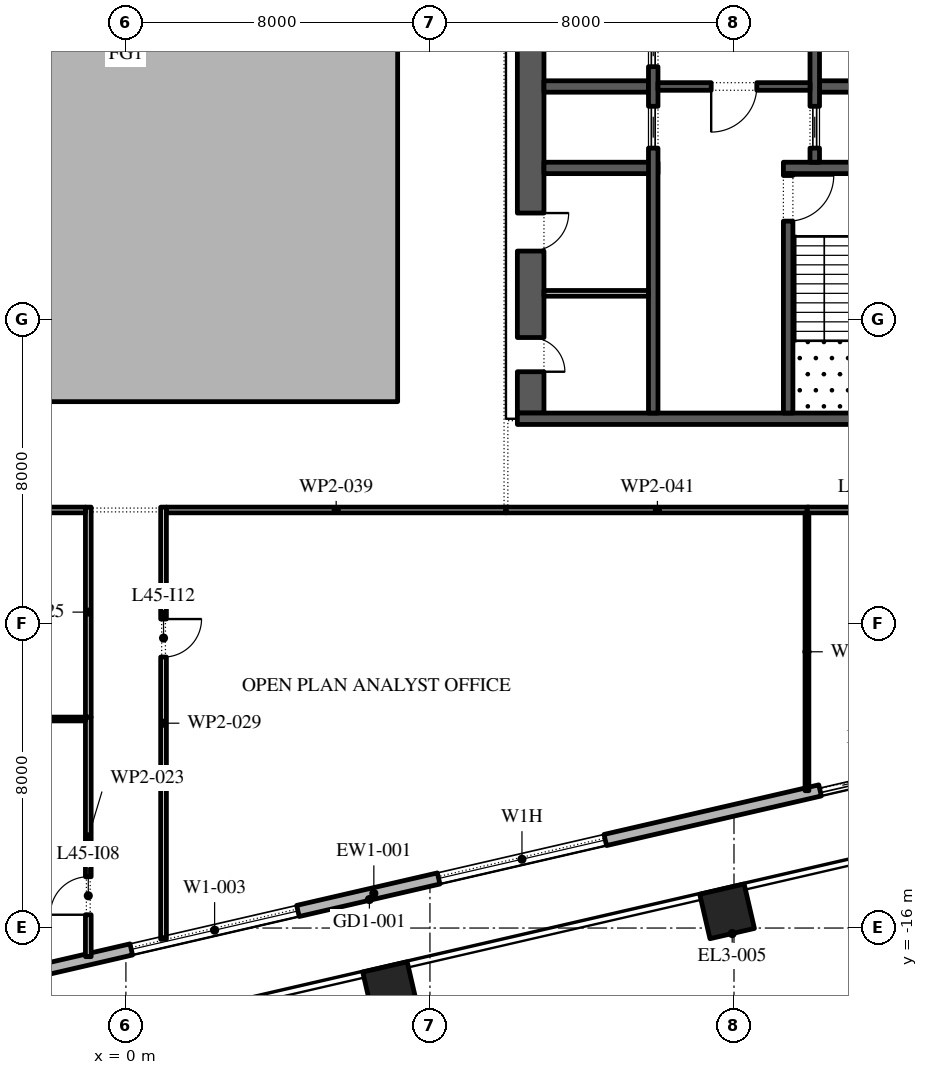
"""IFC4 building model, lengths in metres.
Left out: names, types, materials, properties, quantities, classifications, styles, units other than length and angle.
Written with IfcOpenShell. Run it as: python <this file> out.ifc"""

import sys

from ifc_helpers import new_model, si_unit, direction, frame, frame_2d, origin, origin_2d, place, context, subcontext, project, spatial, polyline, rectangle, outline, extrude, element, fill, save


model = new_model("IFC4")
c1 = context("Model", 3, precision=1e-05, world=origin(), true_north=direction((0.0, 1.0)))
c2 = subcontext(c1, "Body", "Model", "MODEL_VIEW")
j1 = project(units=[si_unit("LENGTHUNIT", "METRE"), si_unit("PLANEANGLEUNIT", "RADIAN")], contexts=[c1])
p1 = place(None, origin())
s1 = spatial("IfcSite", under=j1, at=p1, CompositionType="ELEMENT")
p2 = place(p1, origin())
s2 = spatial("IfcBuilding", under=s1, at=p2, CompositionType="ELEMENT")
p3 = place(p2, frame((0.0, 0.0, 205.2)))
s3 = spatial("IfcBuildingStorey", under=s2, at=p3, CompositionType="ELEMENT", Elevation=205.2)
for number, where, z_axis, x_axis in (
    (1, (6.951, -17.608, 0.0), (0.0, 0.0, 1.0), (0.974, 0.225, 0.0)),
    (2, (15.818, -15.561, 0.0), (0.0, 0.0, 1.0), (0.974, 0.225, 0.0)),
):
    element("IfcColumn", number, at=place(p3, frame(where, z_axis=z_axis, x_axis=x_axis)), inside=s3, PredefinedType="COLUMN", context=c2, shape_type="SweptSolid", body=[
        extrude(rectangle(XDim=1.2, YDim=1.2, at=origin_2d()), origin(), (0.0, 0.0, 1.0), 4.2),
    ])
p4 = place(p3, origin())
e3 = element("IfcWall", 3, at=p4, inside=s3, PredefinedType="STANDARD", context=c2, shape_type="SweptSolid", body=[
    extrude(outline(polyline([(-7.15, -2.15), (7.15, -2.15), (7.15, 16.15), (-7.15, 16.15), (-7.15, -2.15)]), holes=[polyline([(-7.0, -2.0), (-7.0, 16.0), (7.0, 16.0), (7.0, -2.0), (-7.0, -2.0)])]), origin(), (0.0, 0.0, 1.0), 4.0),
])
p5 = place(p3, frame((-17.592, -20.657, 0.0), z_axis=(0.0, 0.0, 1.0), x_axis=(0.974370243697, 0.224950279389, 0.0)))
e4 = element("IfcWall", 4, at=p5, inside=s3, PredefinedType="STANDARD", context=c2, shape_type="SweptSolid", body=[
    extrude(rectangle(XDim=49.5, YDim=0.3, at=frame_2d((24.75, 0.0))), origin(), (0.0, 0.0, 1.0), 4.0),
])
p6 = place(p5, frame((2.8, 0.0, 0.0)))
e5 = element("IfcOpeningElement", 5, at=p6, cuts=e4, PredefinedType="OPENING", context=c2, shape_type="SweptSolid", body=[
    extrude(rectangle(XDim=2.4, YDim=3.5, at=frame_2d((1.2, 1.75))), frame((0.0, 0.16, 0.0), z_axis=(0.0, -1.0, 0.0), x_axis=(1.0, 0.0, 0.0)), (0.0, 0.0, 1.0), 0.32),
])
p7 = place(p5, frame((9.9, 0.0, 0.45)))
e6 = element("IfcOpeningElement", 6, at=p7, cuts=e4, PredefinedType="OPENING", context=c2, shape_type="SweptSolid", body=[
    extrude(rectangle(XDim=4.5, YDim=2.575, at=frame_2d((2.25, 1.288))), frame((0.0, 0.16, 0.0), z_axis=(0.0, -1.0, 0.0), x_axis=(1.0, 0.0, 0.0)), (0.0, 0.0, 1.0), 0.32),
])
p8 = place(p5, frame((18.2, 0.0, 0.45)))
e7 = element("IfcOpeningElement", 7, at=p8, cuts=e4, PredefinedType="OPENING", context=c2, shape_type="SweptSolid", body=[
    extrude(rectangle(XDim=4.5, YDim=3.05, at=frame_2d((2.25, 1.525))), frame((0.0, 0.16, 0.0), z_axis=(0.0, -1.0, 0.0), x_axis=(1.0, 0.0, 0.0)), (0.0, 0.0, 1.0), 0.32),
])
p9 = place(p5, frame((26.5, 0.0, 0.45)))
e8 = element("IfcOpeningElement", 8, at=p9, cuts=e4, PredefinedType="OPENING", context=c2, shape_type="SweptSolid", body=[
    extrude(rectangle(XDim=4.5, YDim=2.75, at=frame_2d((2.25, 1.375))), frame((0.0, 0.16, 0.0), z_axis=(0.0, -1.0, 0.0), x_axis=(1.0, 0.0, 0.0)), (0.0, 0.0, 1.0), 0.32),
])
p10 = place(p5, frame((36.8, 0.0, 0.0)))
e9 = element("IfcOpeningElement", 9, at=p10, cuts=e4, PredefinedType="OPENING", context=c2, shape_type="SweptSolid", body=[
    extrude(rectangle(XDim=2.4, YDim=3.275, at=frame_2d((1.2, 1.637))), frame((0.0, 0.16, 0.0), z_axis=(0.0, -1.0, 0.0), x_axis=(1.0, 0.0, 0.0)), (0.0, 0.0, 1.0), 0.32),
])
p11 = place(p5, frame((43.1, 0.0, 0.45)))
e10 = element("IfcOpeningElement", 10, at=p11, cuts=e4, PredefinedType="OPENING", context=c2, shape_type="SweptSolid", body=[
    extrude(rectangle(XDim=4.5, YDim=2.875, at=frame_2d((2.25, 1.438))), frame((0.0, 0.16, 0.0), z_axis=(0.0, -1.0, 0.0), x_axis=(1.0, 0.0, 0.0)), (0.0, 0.0, 1.0), 0.32),
])
p12 = place(p3, frame((10.65, -2.45, 0.0), z_axis=(0.0, 0.0, 1.0), x_axis=(0.0, 1.0, 0.0)))
e11 = element("IfcWall", 11, at=p12, inside=s3, PredefinedType="SHEAR", context=c2, shape_type="SweptSolid", body=[
    extrude(rectangle(XDim=27.9, YDim=0.7, at=frame_2d((13.95, 0.0))), origin(), (0.0, 0.0, 1.0), 4.0),
])
p13 = place(p12, frame((23.65, 0.0, 0.0)))
e12 = element("IfcOpeningElement", 12, at=p13, cuts=e11, PredefinedType="OPENING", context=c2, shape_type="SweptSolid", body=[
    extrude(rectangle(XDim=2.4, YDim=2.1, at=frame_2d((1.2, 1.05))), frame((0.0, 0.36, 0.0), z_axis=(0.0, -1.0, 0.0), x_axis=(1.0, 0.0, 0.0)), (0.0, 0.0, 1.0), 0.72),
])
p14 = place(p12, frame((1.087, 0.0, 0.0)))
e13 = element("IfcOpeningElement", 13, at=p14, cuts=e11, PredefinedType="OPENING", context=c2, shape_type="SweptSolid", body=[
    extrude(rectangle(XDim=0.9, YDim=2.1, at=frame_2d((0.45, 1.05))), frame((0.0, 0.36, 0.0), z_axis=(0.0, -1.0, 0.0), x_axis=(1.0, 0.0, 0.0)), (0.0, 0.0, 1.0), 0.72),
])
p15 = place(p12, frame((4.262, 0.0, 0.0)))
e14 = element("IfcOpeningElement", 14, at=p15, cuts=e11, PredefinedType="OPENING", context=c2, shape_type="SweptSolid", body=[
    extrude(rectangle(XDim=1.0, YDim=2.1, at=frame_2d((0.5, 1.05))), frame((0.0, 0.36, 0.0), z_axis=(0.0, -1.0, 0.0), x_axis=(1.0, 0.0, 0.0)), (0.0, 0.0, 1.0), 0.72),
])
p16 = place(p3, frame((10.3, -2.6, 0.0), z_axis=(0.0, 0.0, 1.0), x_axis=(1.0, 0.0, 0.0)))
e15 = element("IfcWall", 15, at=p16, inside=s3, PredefinedType="SHEAR", context=c2, shape_type="SweptSolid", body=[
    extrude(rectangle(XDim=11.4, YDim=0.3, at=frame_2d((5.7, 0.0))), origin(), (0.0, 0.0, 1.0), 4.0),
])
p17 = place(p3, frame((17.3, 4.0, 0.0), z_axis=(0.0, 0.0, 1.0), x_axis=(1.0, 0.0, 0.0)))
e16 = element("IfcWall", 16, at=p17, inside=s3, PredefinedType="SHEAR", context=c2, shape_type="SweptSolid", body=[
    extrude(rectangle(XDim=3.7, YDim=0.3, at=frame_2d((1.85, 0.0))), origin(), (0.0, 0.0, 1.0), 4.0),
])
p18 = place(p3, frame((17.425, -2.45, 0.0), z_axis=(0.0, 0.0, 1.0), x_axis=(0.0, 1.0, 0.0)))
e17 = element("IfcWall", 17, at=p18, inside=s3, PredefinedType="SHEAR", context=c2, shape_type="SweptSolid", body=[
    extrude(rectangle(XDim=6.3, YDim=0.25, at=frame_2d((3.15, 0.0))), origin(), (0.0, 0.0, 1.0), 4.0),
])
p19 = place(p18, frame((5.05, 0.0, 0.0)))
e18 = element("IfcOpeningElement", 18, at=p19, cuts=e17, PredefinedType="OPENING", context=c2, shape_type="SweptSolid", body=[
    extrude(rectangle(XDim=1.2, YDim=2.1, at=frame_2d((0.6, 1.05))), frame((0.0, 0.135, 0.0), z_axis=(0.0, -1.0, 0.0), x_axis=(1.0, 0.0, 0.0)), (0.0, 0.0, 1.0), 0.27),
])
p20 = place(p3, frame((18.25, 6.143, 0.0), z_axis=(0.0, 0.0, 1.0), x_axis=(1.0, 0.0, 0.0)))
e19 = element("IfcWall", 19, at=p20, inside=s3, PredefinedType="SHEAR", context=c2, shape_type="SweptSolid", body=[
    extrude(rectangle(XDim=2.75, YDim=0.3, at=frame_2d((1.375, 0.0))), origin(), (0.0, 0.0, 1.0), 4.0),
])
p21 = place(p3, frame((18.125, 4.15, 0.0), z_axis=(0.0, 0.0, 1.0), x_axis=(0.0, 1.0, 0.0)))
e20 = element("IfcWall", 20, at=p21, inside=s3, PredefinedType="SHEAR", context=c2, shape_type="SweptSolid", body=[
    extrude(rectangle(XDim=14.7, YDim=0.25, at=frame_2d((7.35, 0.0))), origin(), (0.0, 0.0, 1.0), 4.0),
])
p22 = place(p21, frame((3.246, 0.0, 0.0)))
e21 = element("IfcOpeningElement", 21, at=p22, cuts=e20, PredefinedType="OPENING", context=c2, shape_type="SweptSolid", body=[
    extrude(rectangle(XDim=0.9, YDim=2.1, at=frame_2d((0.45, 1.05))), frame((0.0, 0.135, 0.0), z_axis=(0.0, -1.0, 0.0), x_axis=(1.0, 0.0, 0.0)), (0.0, 0.0, 1.0), 0.27),
])
p23 = place(p21, frame((8.454, 0.0, 0.0)))
e22 = element("IfcOpeningElement", 22, at=p23, cuts=e20, PredefinedType="OPENING", context=c2, shape_type="SweptSolid", body=[
    extrude(rectangle(XDim=0.9, YDim=2.1, at=frame_2d((0.45, 1.05))), frame((0.0, 0.135, 0.0), z_axis=(0.0, -1.0, 0.0), x_axis=(1.0, 0.0, 0.0)), (0.0, 0.0, 1.0), 0.27),
])
p24 = place(p21, frame((0.371, 0.0, 0.0)))
e23 = element("IfcOpeningElement", 23, at=p24, cuts=e20, PredefinedType="OPENING", context=c2, shape_type="SweptSolid", body=[
    extrude(rectangle(XDim=1.1, YDim=2.1, at=frame_2d((0.55, 1.05))), frame((0.0, 0.135, 0.0), z_axis=(0.0, -1.0, 0.0), x_axis=(1.0, 0.0, 0.0)), (0.0, 0.0, 1.0), 0.27),
])
p25 = place(p21, frame((13.229, 0.0, 0.0)))
e24 = element("IfcOpeningElement", 24, at=p25, cuts=e20, PredefinedType="OPENING", context=c2, shape_type="SweptSolid", body=[
    extrude(rectangle(XDim=1.1, YDim=2.1, at=frame_2d((0.55, 1.05))), frame((0.0, 0.135, 0.0), z_axis=(0.0, -1.0, 0.0), x_axis=(1.0, 0.0, 0.0)), (0.0, 0.0, 1.0), 0.27),
])
p26 = place(p3, frame((11.0, 4.0, 0.0), z_axis=(0.0, 0.0, 1.0), x_axis=(1.0, 0.0, 0.0)))
e25 = element("IfcWall", 25, at=p26, inside=s3, PredefinedType="SHEAR", context=c2, shape_type="SweptSolid", body=[
    extrude(rectangle(XDim=3.0, YDim=0.3, at=frame_2d((1.5, 0.0))), origin(), (0.0, 0.0, 1.0), 4.0),
])
p27 = place(p3, frame((11.0, 6.143, 0.0), z_axis=(0.0, 0.0, 1.0), x_axis=(1.0, 0.0, 0.0)))
e26 = element("IfcWall", 26, at=p27, inside=s3, PredefinedType="SHEAR", context=c2, shape_type="SweptSolid", body=[
    extrude(rectangle(XDim=2.75, YDim=0.3, at=frame_2d((1.375, 0.0))), origin(), (0.0, 0.0, 1.0), 4.0),
])
p28 = place(p3, frame((13.875, -2.45, 0.0), z_axis=(0.0, 0.0, 1.0), x_axis=(0.0, 1.0, 0.0)))
e27 = element("IfcWall", 27, at=p28, inside=s3, PredefinedType="SHEAR", context=c2, shape_type="SweptSolid", body=[
    extrude(rectangle(XDim=21.3, YDim=0.25, at=frame_2d((10.65, 0.0))), origin(), (0.0, 0.0, 1.0), 4.0),
])
p29 = place(p28, frame((16.261, 0.0, 0.0)))
e28 = element("IfcOpeningElement", 28, at=p29, cuts=e27, PredefinedType="OPENING", context=c2, shape_type="SweptSolid", body=[
    extrude(rectangle(XDim=0.9, YDim=2.1, at=frame_2d((0.45, 1.05))), frame((0.0, 0.135, 0.0), z_axis=(0.0, -1.0, 0.0), x_axis=(1.0, 0.0, 0.0)), (0.0, 0.0, 1.0), 0.27),
])
p30 = place(p28, frame((19.325, 0.0, 0.0)))
e29 = element("IfcOpeningElement", 29, at=p30, cuts=e27, PredefinedType="OPENING", context=c2, shape_type="SweptSolid", body=[
    extrude(rectangle(XDim=0.9, YDim=2.1, at=frame_2d((0.45, 1.05))), frame((0.0, 0.135, 0.0), z_axis=(0.0, -1.0, 0.0), x_axis=(1.0, 0.0, 0.0)), (0.0, 0.0, 1.0), 0.27),
])
p31 = place(p28, frame((6.971, 0.0, 0.0)))
e30 = element("IfcOpeningElement", 30, at=p31, cuts=e27, PredefinedType="OPENING", context=c2, shape_type="SweptSolid", body=[
    extrude(rectangle(XDim=1.1, YDim=2.1, at=frame_2d((0.55, 1.05))), frame((0.0, 0.135, 0.0), z_axis=(0.0, -1.0, 0.0), x_axis=(1.0, 0.0, 0.0)), (0.0, 0.0, 1.0), 0.27),
])
p32 = place(p28, frame((9.114, 0.0, 0.0)))
e31 = element("IfcOpeningElement", 31, at=p32, cuts=e27, PredefinedType="OPENING", context=c2, shape_type="SweptSolid", body=[
    extrude(rectangle(XDim=1.1, YDim=2.1, at=frame_2d((0.55, 1.05))), frame((0.0, 0.135, 0.0), z_axis=(0.0, -1.0, 0.0), x_axis=(1.0, 0.0, 0.0)), (0.0, 0.0, 1.0), 0.27),
])
p33 = place(p28, frame((11.257, 0.0, 0.0)))
e32 = element("IfcOpeningElement", 32, at=p33, cuts=e27, PredefinedType="OPENING", context=c2, shape_type="SweptSolid", body=[
    extrude(rectangle(XDim=1.1, YDim=2.1, at=frame_2d((0.55, 1.05))), frame((0.0, 0.135, 0.0), z_axis=(0.0, -1.0, 0.0), x_axis=(1.0, 0.0, 0.0)), (0.0, 0.0, 1.0), 0.27),
])
p34 = place(p28, frame((13.4, 0.0, 0.0)))
e33 = element("IfcOpeningElement", 33, at=p34, cuts=e27, PredefinedType="OPENING", context=c2, shape_type="SweptSolid", body=[
    extrude(rectangle(XDim=1.1, YDim=2.1, at=frame_2d((0.55, 1.05))), frame((0.0, 0.135, 0.0), z_axis=(0.0, -1.0, 0.0), x_axis=(1.0, 0.0, 0.0)), (0.0, 0.0, 1.0), 0.27),
])
p35 = place(p3, frame((14.0, 6.143, 0.0), z_axis=(0.0, 0.0, 1.0), x_axis=(1.0, 0.0, 0.0)))
e34 = element("IfcWall", 34, at=p35, inside=s3, PredefinedType="SHEAR", context=c2, shape_type="SweptSolid", body=[
    extrude(rectangle(XDim=4.0, YDim=0.2, at=frame_2d((2.0, 0.0))), origin(), (0.0, 0.0, 1.0), 4.0),
])
p36 = place(p35, frame((1.4, 0.0, 0.0)))
e35 = element("IfcOpeningElement", 35, at=p36, cuts=e34, PredefinedType="OPENING", context=c2, shape_type="SweptSolid", body=[
    extrude(rectangle(XDim=1.2, YDim=2.1, at=frame_2d((0.6, 1.05))), frame((0.0, 0.11, 0.0), z_axis=(0.0, -1.0, 0.0), x_axis=(1.0, 0.0, 0.0)), (0.0, 0.0, 1.0), 0.22),
])
p37 = place(p3, frame((11.0, 0.7, 0.0), z_axis=(0.0, 0.0, 1.0), x_axis=(1.0, 0.0, 0.0)))
e36 = element("IfcWall", 36, at=p37, inside=s3, PredefinedType="PARTITIONING", context=c2, shape_type="SweptSolid", body=[
    extrude(rectangle(XDim=2.75, YDim=0.15, at=frame_2d((1.375, 0.0))), origin(), (0.0, 0.0, 1.0), 4.0),
])
p38 = place(p3, frame((-0.99, -16.753, 0.0), z_axis=(0.0, 0.0, 1.0), x_axis=(0.0, 1.0, 0.0)))
e37 = element("IfcWall", 37, at=p38, inside=s3, PredefinedType="PARTITIONING", context=c2, shape_type="SweptSolid", body=[
    extrude(rectangle(XDim=6.303, YDim=0.15, at=frame_2d((3.151, 0.0))), origin(), (0.0, 0.0, 1.0), 4.0),
])
p39 = place(p38, frame((1.103, 0.0, 0.0)))
e38 = element("IfcOpeningElement", 38, at=p39, cuts=e37, PredefinedType="OPENING", context=c2, shape_type="SweptSolid", body=[
    extrude(rectangle(XDim=1.0, YDim=2.1, at=frame_2d((0.5, 1.05))), frame((0.0, 0.085, 0.0), z_axis=(0.0, -1.0, 0.0), x_axis=(1.0, 0.0, 0.0)), (0.0, 0.0, 1.0), 0.17),
])
p40 = place(p3, frame((-1.065, -10.5, 0.0), z_axis=(0.0, 0.0, 1.0), x_axis=(-1.0, 0.0, 0.0)))
e39 = element("IfcWall", 39, at=p40, inside=s3, PredefinedType="PARTITIONING", context=c2, shape_type="SweptSolid", body=[
    extrude(rectangle(XDim=21.405, YDim=0.1, at=frame_2d((10.703, 0.0))), origin(), (0.0, 0.0, 1.0), 4.0),
])
p41 = place(p3, frame((-0.99, -10.45, 0.0), z_axis=(0.0, 0.0, 1.0), x_axis=(0.0, 1.0, 0.0)))
e40 = element("IfcWall", 40, at=p41, inside=s3, PredefinedType="PARTITIONING", context=c2, shape_type="SweptSolid", body=[
    extrude(rectangle(XDim=5.525, YDim=0.15, at=frame_2d((2.762, 0.0))), origin(), (0.0, 0.0, 1.0), 4.0),
])
p42 = place(p3, frame((-1.065, -5.0, 0.0), z_axis=(0.0, 0.0, 1.0), x_axis=(-1.0, 0.0, 0.0)))
e41 = element("IfcWall", 41, at=p42, inside=s3, PredefinedType="PARTITIONING", context=c2, shape_type="SweptSolid", body=[
    extrude(rectangle(XDim=8.935, YDim=0.15, at=frame_2d((4.468, 0.0))), origin(), (0.0, 0.0, 1.0), 4.0),
])
p43 = place(p3, frame((0.99, -4.925, 0.0), z_axis=(0.0, 0.0, 1.0), x_axis=(0.0, -1.0, 0.0)))
e42 = element("IfcWall", 42, at=p43, inside=s3, PredefinedType="PARTITIONING", context=c2, shape_type="SweptSolid", body=[
    extrude(rectangle(XDim=11.371, YDim=0.15, at=frame_2d((5.686, 0.0))), origin(), (0.0, 0.0, 1.0), 4.0),
])
p44 = place(p43, frame((2.945, 0.0, 0.0)))
e43 = element("IfcOpeningElement", 43, at=p44, cuts=e42, PredefinedType="OPENING", context=c2, shape_type="SweptSolid", body=[
    extrude(rectangle(XDim=1.0, YDim=2.1, at=frame_2d((0.5, 1.05))), frame((0.0, 0.085, 0.0), z_axis=(0.0, -1.0, 0.0), x_axis=(1.0, 0.0, 0.0)), (0.0, 0.0, 1.0), 0.17),
])
p45 = place(p3, frame((10.0, -5.0, 0.0), z_axis=(0.0, 0.0, 1.0), x_axis=(-1.0, 0.0, 0.0)))
e44 = element("IfcWall", 44, at=p45, inside=s3, PredefinedType="PARTITIONING", context=c2, shape_type="SweptSolid", body=[
    extrude(rectangle(XDim=8.935, YDim=0.15, at=frame_2d((4.468, 0.0))), origin(), (0.0, 0.0, 1.0), 4.0),
])
p46 = place(p3, frame((17.97, -5.0, 0.0), z_axis=(0.0, 0.0, 1.0), x_axis=(-1.0, 0.0, 0.0)))
e45 = element("IfcWall", 45, at=p46, inside=s3, PredefinedType="PARTITIONING", context=c2, shape_type="SweptSolid", body=[
    extrude(rectangle(XDim=7.97, YDim=0.15, at=frame_2d((3.985, 0.0))), origin(), (0.0, 0.0, 1.0), 4.0),
])
p47 = place(p3, frame((17.92, -5.075, 0.0), z_axis=(0.0, 0.0, 1.0), x_axis=(0.0, -1.0, 0.0)))
e46 = element("IfcWall", 46, at=p47, inside=s3, PredefinedType="PARTITIONING", context=c2, shape_type="SweptSolid", body=[
    extrude(rectangle(XDim=7.312, YDim=0.1, at=frame_2d((3.656, 0.0))), origin(), (0.0, 0.0, 1.0), 4.0),
])
p48 = place(p3, frame((23.84, -5.0, 0.0), z_axis=(0.0, 0.0, 1.0), x_axis=(-1.0, 0.0, 0.0)))
e47 = element("IfcWall", 47, at=p48, inside=s3, PredefinedType="PARTITIONING", context=c2, shape_type="SweptSolid", body=[
    extrude(rectangle(XDim=5.92, YDim=0.15, at=frame_2d((2.96, 0.0))), origin(), (0.0, 0.0, 1.0), 4.0),
])
p49 = place(p48, frame((3.77, 0.0, 0.0)))
e48 = element("IfcOpeningElement", 48, at=p49, cuts=e47, PredefinedType="OPENING", context=c2, shape_type="SweptSolid", body=[
    extrude(rectangle(XDim=1.0, YDim=2.1, at=frame_2d((0.5, 1.05))), frame((0.0, 0.085, 0.0), z_axis=(0.0, -1.0, 0.0), x_axis=(1.0, 0.0, 0.0)), (0.0, 0.0, 1.0), 0.17),
])
p50 = place(p8, origin())
e49 = element("IfcWindow", 49, at=p50, inside=s3, PartitioningType="DOUBLE_PANEL_VERTICAL", PredefinedType="WINDOW", context=c2, shape_type="SweptSolid", body=[
    extrude(rectangle(XDim=4.5, YDim=3.05, at=frame_2d((2.25, 1.525))), frame((0.0, 0.03, 0.0), z_axis=(0.0, -1.0, 0.0), x_axis=(1.0, 0.0, 0.0)), (0.0, 0.0, 1.0), 0.06),
])
fill(e7, e49)
p51 = place(p9, origin())
e50 = element("IfcWindow", 50, at=p51, inside=s3, PartitioningType="DOUBLE_PANEL_VERTICAL", PredefinedType="WINDOW", context=c2, shape_type="SweptSolid", body=[
    extrude(rectangle(XDim=4.5, YDim=2.75, at=frame_2d((2.25, 1.375))), frame((0.0, 0.03, 0.0), z_axis=(0.0, -1.0, 0.0), x_axis=(1.0, 0.0, 0.0)), (0.0, 0.0, 1.0), 0.06),
])
fill(e8, e50)
p52 = place(p10, origin())
e51 = element("IfcDoor", 51, at=p52, inside=s3, OperationType="DOUBLE_DOOR_SLIDING", PredefinedType="DOOR", context=c2, shape_type="SweptSolid", body=[
    extrude(rectangle(XDim=2.4, YDim=3.275, at=frame_2d((1.2, 1.637))), frame((0.0, 0.025, 0.0), z_axis=(0.0, -1.0, 0.0), x_axis=(1.0, 0.0, 0.0)), (0.0, 0.0, 1.0), 0.05),
])
fill(e9, e51)
p53 = place(p24, origin())
e52 = element("IfcDoor", 52, at=p53, inside=s3, OperationType="SLIDING_TO_LEFT", PredefinedType="DOOR", context=c2, shape_type="SweptSolid", body=[
    extrude(rectangle(XDim=1.1, YDim=2.1, at=frame_2d((0.55, 1.05))), frame((0.0, 0.025, 0.0), z_axis=(0.0, -1.0, 0.0), x_axis=(1.0, 0.0, 0.0)), (0.0, 0.0, 1.0), 0.05),
])
fill(e23, e52)
p54 = place(p31, origin())
e53 = element("IfcDoor", 53, at=p54, inside=s3, OperationType="SLIDING_TO_LEFT", PredefinedType="DOOR", context=c2, shape_type="SweptSolid", body=[
    extrude(rectangle(XDim=1.1, YDim=2.1, at=frame_2d((0.55, 1.05))), frame((0.0, 0.025, 0.0), z_axis=(0.0, -1.0, 0.0), x_axis=(1.0, 0.0, 0.0)), (0.0, 0.0, 1.0), 0.05),
])
fill(e30, e53)
p55 = place(p32, origin())
e54 = element("IfcDoor", 54, at=p55, inside=s3, OperationType="SLIDING_TO_LEFT", PredefinedType="DOOR", context=c2, shape_type="SweptSolid", body=[
    extrude(rectangle(XDim=1.1, YDim=2.1, at=frame_2d((0.55, 1.05))), frame((0.0, 0.025, 0.0), z_axis=(0.0, -1.0, 0.0), x_axis=(1.0, 0.0, 0.0)), (0.0, 0.0, 1.0), 0.05),
])
fill(e31, e54)
p56 = place(p36, frame((1.2, 0.0, 0.0), z_axis=(0.0, 0.0, 1.0), x_axis=(-1.0, 0.0, 0.0)))
e55 = element("IfcDoor", 55, at=p56, inside=s3, OperationType="SINGLE_SWING_LEFT", PredefinedType="DOOR", context=c2, shape_type="SweptSolid", body=[
    extrude(rectangle(XDim=1.2, YDim=2.1, at=frame_2d((0.6, 1.05))), frame((0.0, 0.025, 0.0), z_axis=(0.0, -1.0, 0.0), x_axis=(1.0, 0.0, 0.0)), (0.0, 0.0, 1.0), 0.05),
])
fill(e35, e55)
p57 = place(p19, frame((1.2, 0.0, 0.0), z_axis=(0.0, 0.0, 1.0), x_axis=(-1.0, 0.0, 0.0)))
e56 = element("IfcDoor", 56, at=p57, inside=s3, OperationType="SINGLE_SWING_RIGHT", PredefinedType="DOOR", context=c2, shape_type="SweptSolid", body=[
    extrude(rectangle(XDim=1.2, YDim=2.1, at=frame_2d((0.6, 1.05))), frame((0.0, 0.025, 0.0), z_axis=(0.0, -1.0, 0.0), x_axis=(1.0, 0.0, 0.0)), (0.0, 0.0, 1.0), 0.05),
])
fill(e18, e56)
p58 = place(p14, frame((0.9, -0.65, 0.0), z_axis=(0.0, 0.0, 1.0), x_axis=(-1.0, 0.0, 0.0)))
e57 = element("IfcDoor", 57, at=p58, inside=s3, OperationType="SINGLE_SWING_LEFT", PredefinedType="DOOR", context=c2, shape_type="SweptSolid", body=[
    extrude(rectangle(XDim=0.9, YDim=2.1, at=frame_2d((0.45, 1.05))), frame((0.0, -0.3, 0.0), z_axis=(0.0, -1.0, 0.0), x_axis=(1.0, 0.0, 0.0)), (0.0, 0.0, 1.0), 0.05),
])
fill(e13, e57)
p59 = place(p15, frame((1.0, -0.65, 0.0), z_axis=(0.0, 0.0, 1.0), x_axis=(-1.0, 0.0, 0.0)))
e58 = element("IfcDoor", 58, at=p59, inside=s3, OperationType="SINGLE_SWING_RIGHT", PredefinedType="DOOR", context=c2, shape_type="SweptSolid", body=[
    extrude(rectangle(XDim=1.0, YDim=2.1, at=frame_2d((0.5, 1.05))), frame((0.0, -0.3, 0.0), z_axis=(0.0, -1.0, 0.0), x_axis=(1.0, 0.0, 0.0)), (0.0, 0.0, 1.0), 0.05),
])
fill(e14, e58)
p60 = place(p39, origin())
e59 = element("IfcDoor", 59, at=p60, inside=s3, OperationType="SINGLE_SWING_RIGHT", PredefinedType="DOOR", context=c2, shape_type="SweptSolid", body=[
    extrude(rectangle(XDim=1.0, YDim=2.1, at=frame_2d((0.5, 1.05))), frame((0.0, 0.025, 0.0), z_axis=(0.0, -1.0, 0.0), x_axis=(1.0, 0.0, 0.0)), (0.0, 0.0, 1.0), 0.05),
])
fill(e38, e59)
p61 = place(p44, origin())
e60 = element("IfcDoor", 60, at=p61, inside=s3, OperationType="SINGLE_SWING_RIGHT", PredefinedType="DOOR", context=c2, shape_type="SweptSolid", body=[
    extrude(rectangle(XDim=1.0, YDim=2.1, at=frame_2d((0.5, 1.05))), frame((0.0, 0.025, 0.0), z_axis=(0.0, -1.0, 0.0), x_axis=(1.0, 0.0, 0.0)), (0.0, 0.0, 1.0), 0.05),
])
fill(e43, e60)
save(model, sys.argv[1])
